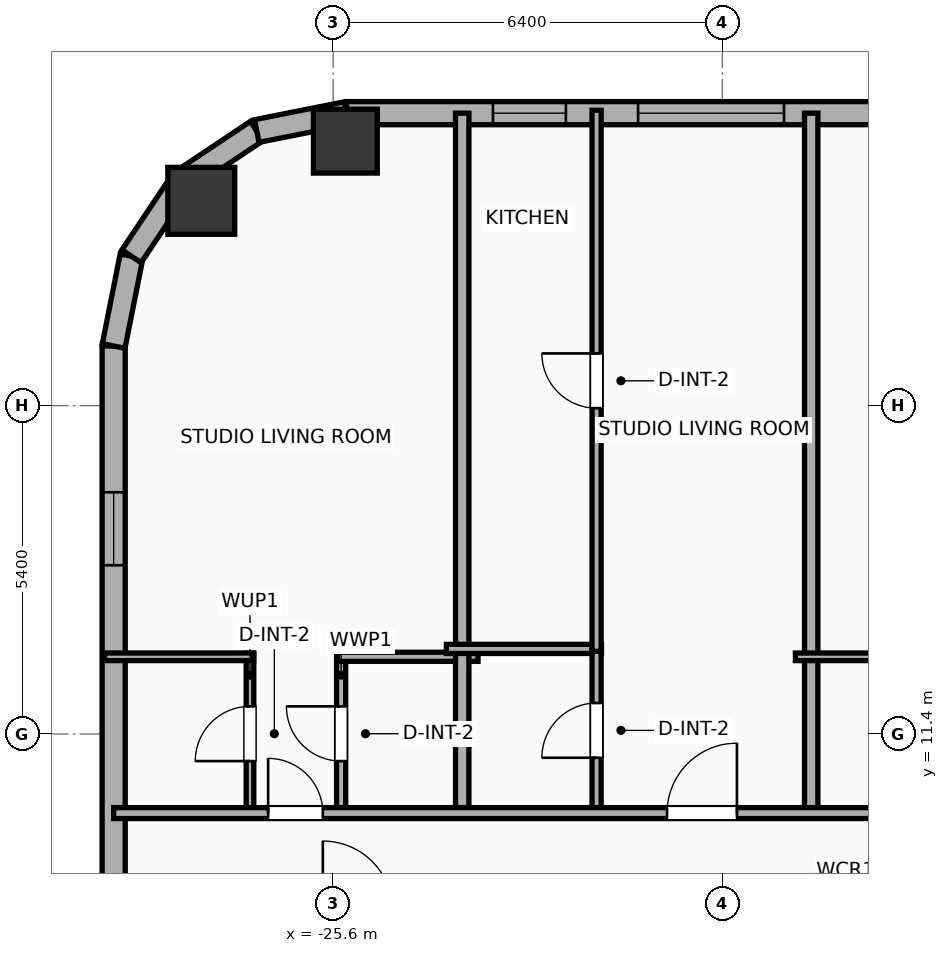
"""IFC4 building model, lengths in metres.
Left out: names, types, materials, properties, quantities, classifications, styles, units other than length and angle.
Written with IfcOpenShell. Run it as: python <this file> out.ifc"""

import sys

from ifc_helpers import new_model, si_unit, direction, frame, frame_2d, origin, origin_2d, place, context, subcontext, project, spatial, rectangle, hollow_rectangle, hollow_circle, extrude, element, fill, save


model = new_model("IFC4")
c1 = context("Model", 3, precision=1e-05, world=origin(), true_north=direction((0.0, 1.0)))
c2 = subcontext(c1, "Body", "Model", "MODEL_VIEW")
j1 = project(units=[si_unit("LENGTHUNIT", "METRE"), si_unit("PLANEANGLEUNIT", "RADIAN")], contexts=[c1])
p1 = place(None, origin())
s1 = spatial("IfcSite", under=j1, at=p1, CompositionType="ELEMENT")
p2 = place(p1, origin())
s2 = spatial("IfcBuilding", under=s1, at=p2, CompositionType="ELEMENT")
p3 = place(p2, frame((0.0, 0.0, 124.8)))
s3 = spatial("IfcBuildingStorey", under=s2, at=p3, CompositionType="ELEMENT", Elevation=124.8)
p4 = place(p3, frame((-25.4, 21.15, 0.0), z_axis=(0.0, 0.0, 1.0), x_axis=(1.0, 0.0, 0.0)))
e1 = element("IfcColumn", 1, at=p4, inside=s3, PredefinedType="COLUMN", context=c2, shape_type="SweptSolid", body=[
    extrude(hollow_rectangle(XDim=1.05, YDim=1.05, WallThickness=0.036, at=origin_2d()), origin(), (0.0, 0.0, 1.0), 3.9),
])
p5 = place(p3, frame((-27.769, 20.169, 0.0), z_axis=(0.0, 0.0, 1.0), x_axis=(1.0, 0.0, 0.0)))
e2 = element("IfcColumn", 2, at=p5, inside=s3, PredefinedType="COLUMN", context=c2, shape_type="SweptSolid", body=[
    extrude(hollow_circle(Radius=0.55, WallThickness=0.036, at=origin_2d()), origin(), (0.0, 0.0, 1.0), 3.9),
])
p6 = place(p3, frame((-29.21, -16.581, 0.0), z_axis=(0.0, 0.0, 1.0), x_axis=(0.0, 1.0, 0.0)))
e3 = element("IfcWall", 3, at=p6, inside=s3, PredefinedType="ELEMENTEDWALL", context=c2, shape_type="SweptSolid", body=[
    extrude(rectangle(XDim=34.363, YDim=0.38, at=frame_2d((17.181, 0.0))), origin(), (0.0, 0.0, 1.0), 3.65),
])
p7 = place(p6, frame((30.757, 0.0, 0.75)))
e4 = element("IfcOpeningElement", 4, at=p7, cuts=e3, PredefinedType="OPENING", context=c2, shape_type="SweptSolid", body=[
    extrude(rectangle(XDim=1.2, YDim=2.05, at=frame_2d((0.6, 1.025))), frame((0.0, 0.2, 0.0), z_axis=(0.0, -1.0, 0.0), x_axis=(1.0, 0.0, 0.0)), (0.0, 0.0, 1.0), 0.4),
])
p8 = place(p6, frame((20.326, 0.0, 0.75)))
e5 = element("IfcOpeningElement", 5, at=p8, cuts=e3, PredefinedType="OPENING", context=c2, shape_type="SweptSolid", body=[
    extrude(rectangle(XDim=1.2, YDim=2.05, at=frame_2d((0.6, 1.025))), frame((0.0, 0.2, 0.0), z_axis=(0.0, -1.0, 0.0), x_axis=(1.0, 0.0, 0.0)), (0.0, 0.0, 1.0), 0.4),
])
p9 = place(p6, frame((11.776, 0.0, 0.75)))
e6 = element("IfcOpeningElement", 6, at=p9, cuts=e3, PredefinedType="OPENING", context=c2, shape_type="SweptSolid", body=[
    extrude(rectangle(XDim=1.2, YDim=2.05, at=frame_2d((0.6, 1.025))), frame((0.0, 0.2, 0.0), z_axis=(0.0, -1.0, 0.0), x_axis=(1.0, 0.0, 0.0)), (0.0, 0.0, 1.0), 0.4),
])
p10 = place(p3, frame((-29.21, 17.781, 0.0), z_axis=(0.0, 0.0, 1.0), x_axis=(0.195086038585, 0.980786132421, 0.0)))
e7 = element("IfcWall", 7, at=p10, inside=s3, PredefinedType="ELEMENTEDWALL", context=c2, shape_type="SweptSolid", body=[
    extrude(rectangle(XDim=1.504, YDim=0.38, at=frame_2d((0.752, 0.0))), origin(), (0.0, 0.0, 1.0), 3.65),
])
p11 = place(p3, frame((-28.917, 19.257, 0.0), z_axis=(0.0, 0.0, 1.0), x_axis=(0.555610286119, 0.831442848281, 0.0)))
e8 = element("IfcWall", 8, at=p11, inside=s3, PredefinedType="ELEMENTEDWALL", context=c2, shape_type="SweptSolid", body=[
    extrude(rectangle(XDim=1.485, YDim=0.38, at=frame_2d((0.743, 0.0))), origin(), (0.0, 0.0, 1.0), 3.65),
])
p12 = place(p3, frame((-28.091, 20.491, 0.0), z_axis=(0.0, 0.0, 1.0), x_axis=(0.831468045563, 0.555572577804, 0.0)))
e9 = element("IfcWall", 9, at=p12, inside=s3, PredefinedType="ELEMENTEDWALL", context=c2, shape_type="SweptSolid", body=[
    extrude(rectangle(XDim=1.485, YDim=0.38, at=frame_2d((0.742, 0.0))), origin(), (0.0, 0.0, 1.0), 3.65),
])
p13 = place(p3, frame((-26.857, 21.316, 0.0), z_axis=(0.0, 0.0, 1.0), x_axis=(0.980755066645, 0.195242155415, 0.0)))
e10 = element("IfcWall", 10, at=p13, inside=s3, PredefinedType="ELEMENTEDWALL", context=c2, shape_type="SweptSolid", body=[
    extrude(rectangle(XDim=1.504, YDim=0.38, at=frame_2d((0.752, 0.0))), origin(), (0.0, 0.0, 1.0), 3.65),
])
p14 = place(p3, frame((-25.381, 21.61, 0.0), z_axis=(0.0, 0.0, 1.0), x_axis=(1.0, 0.0, 0.0)))
e11 = element("IfcWall", 11, at=p14, inside=s3, PredefinedType="ELEMENTEDWALL", context=c2, shape_type="SweptSolid", body=[
    extrude(rectangle(XDim=54.763, YDim=0.38, at=frame_2d((27.381, 0.0))), origin(), (0.0, 0.0, 1.0), 3.65),
])
p15 = place(p14, frame((4.795, 0.0, 0.75)))
e12 = element("IfcOpeningElement", 12, at=p15, cuts=e11, PredefinedType="OPENING", context=c2, shape_type="SweptSolid", body=[
    extrude(rectangle(XDim=2.4, YDim=2.1, at=frame_2d((1.2, 1.05))), frame((0.0, 0.2, 0.0), z_axis=(0.0, -1.0, 0.0), x_axis=(1.0, 0.0, 0.0)), (0.0, 0.0, 1.0), 0.4),
])
p16 = place(p14, frame((45.867, 0.0, 0.75)))
e13 = element("IfcOpeningElement", 13, at=p16, cuts=e11, PredefinedType="OPENING", context=c2, shape_type="SweptSolid", body=[
    extrude(rectangle(XDim=2.4, YDim=2.1, at=frame_2d((1.2, 1.05))), frame((0.0, 0.2, 0.0), z_axis=(0.0, -1.0, 0.0), x_axis=(1.0, 0.0, 0.0)), (0.0, 0.0, 1.0), 0.4),
])
p17 = place(p14, frame((2.408, 0.0, 0.75)))
e14 = element("IfcOpeningElement", 14, at=p17, cuts=e11, PredefinedType="OPENING", context=c2, shape_type="SweptSolid", body=[
    extrude(rectangle(XDim=1.2, YDim=2.05, at=frame_2d((0.6, 1.025))), frame((0.0, 0.2, 0.0), z_axis=(0.0, -1.0, 0.0), x_axis=(1.0, 0.0, 0.0)), (0.0, 0.0, 1.0), 0.4),
])
p18 = place(p14, frame((8.952, 0.0, 0.75)))
e15 = element("IfcOpeningElement", 15, at=p18, cuts=e11, PredefinedType="OPENING", context=c2, shape_type="SweptSolid", body=[
    extrude(rectangle(XDim=1.2, YDim=2.05, at=frame_2d((0.6, 1.025))), frame((0.0, 0.2, 0.0), z_axis=(0.0, -1.0, 0.0), x_axis=(1.0, 0.0, 0.0)), (0.0, 0.0, 1.0), 0.4),
])
p19 = place(p14, frame((17.132, 0.0, 0.75)))
e16 = element("IfcOpeningElement", 16, at=p19, cuts=e11, PredefinedType="OPENING", context=c2, shape_type="SweptSolid", body=[
    extrude(rectangle(XDim=1.2, YDim=2.05, at=frame_2d((0.6, 1.025))), frame((0.0, 0.2, 0.0), z_axis=(0.0, -1.0, 0.0), x_axis=(1.0, 0.0, 0.0)), (0.0, 0.0, 1.0), 0.4),
])
p20 = place(p14, frame((14.007, 0.0, 0.75)))
e17 = element("IfcOpeningElement", 17, at=p20, cuts=e11, PredefinedType="OPENING", context=c2, shape_type="SweptSolid", body=[
    extrude(rectangle(XDim=1.2, YDim=2.05, at=frame_2d((0.6, 1.025))), frame((0.0, 0.2, 0.0), z_axis=(0.0, -1.0, 0.0), x_axis=(1.0, 0.0, 0.0)), (0.0, 0.0, 1.0), 0.4),
])
p21 = place(p14, frame((22.636, 0.0, 0.75)))
e18 = element("IfcOpeningElement", 18, at=p21, cuts=e11, PredefinedType="OPENING", context=c2, shape_type="SweptSolid", body=[
    extrude(rectangle(XDim=1.2, YDim=2.05, at=frame_2d((0.6, 1.025))), frame((0.0, 0.2, 0.0), z_axis=(0.0, -1.0, 0.0), x_axis=(1.0, 0.0, 0.0)), (0.0, 0.0, 1.0), 0.4),
])
p22 = place(p14, frame((27.129, 0.0, 0.75)))
e19 = element("IfcOpeningElement", 19, at=p22, cuts=e11, PredefinedType="OPENING", context=c2, shape_type="SweptSolid", body=[
    extrude(rectangle(XDim=1.2, YDim=2.05, at=frame_2d((0.6, 1.025))), frame((0.0, 0.2, 0.0), z_axis=(0.0, -1.0, 0.0), x_axis=(1.0, 0.0, 0.0)), (0.0, 0.0, 1.0), 0.4),
])
p23 = place(p14, frame((30.254, 0.0, 0.75)))
e20 = element("IfcOpeningElement", 20, at=p23, cuts=e11, PredefinedType="OPENING", context=c2, shape_type="SweptSolid", body=[
    extrude(rectangle(XDim=1.2, YDim=2.05, at=frame_2d((0.6, 1.025))), frame((0.0, 0.2, 0.0), z_axis=(0.0, -1.0, 0.0), x_axis=(1.0, 0.0, 0.0)), (0.0, 0.0, 1.0), 0.4),
])
p24 = place(p14, frame((33.603, 0.0, 0.75)))
e21 = element("IfcOpeningElement", 21, at=p24, cuts=e11, PredefinedType="OPENING", context=c2, shape_type="SweptSolid", body=[
    extrude(rectangle(XDim=1.2, YDim=2.05, at=frame_2d((0.6, 1.025))), frame((0.0, 0.2, 0.0), z_axis=(0.0, -1.0, 0.0), x_axis=(1.0, 0.0, 0.0)), (0.0, 0.0, 1.0), 0.4),
])
p25 = place(p14, frame((36.608, 0.0, 0.75)))
e22 = element("IfcOpeningElement", 22, at=p25, cuts=e11, PredefinedType="OPENING", context=c2, shape_type="SweptSolid", body=[
    extrude(rectangle(XDim=1.2, YDim=2.05, at=frame_2d((0.6, 1.025))), frame((0.0, 0.2, 0.0), z_axis=(0.0, -1.0, 0.0), x_axis=(1.0, 0.0, 0.0)), (0.0, 0.0, 1.0), 0.4),
])
p26 = place(p14, frame((39.446, 0.0, 0.75)))
e23 = element("IfcOpeningElement", 23, at=p26, cuts=e11, PredefinedType="OPENING", context=c2, shape_type="SweptSolid", body=[
    extrude(rectangle(XDim=1.2, YDim=2.05, at=frame_2d((0.6, 1.025))), frame((0.0, 0.2, 0.0), z_axis=(0.0, -1.0, 0.0), x_axis=(1.0, 0.0, 0.0)), (0.0, 0.0, 1.0), 0.4),
])
p27 = place(p14, frame((42.27, 0.0, 0.75)))
e24 = element("IfcOpeningElement", 24, at=p27, cuts=e11, PredefinedType="OPENING", context=c2, shape_type="SweptSolid", body=[
    extrude(rectangle(XDim=0.85, YDim=2.05, at=frame_2d((0.425, 1.025))), frame((0.0, 0.2, 0.0), z_axis=(0.0, -1.0, 0.0), x_axis=(1.0, 0.0, 0.0)), (0.0, 0.0, 1.0), 0.4),
])
p28 = place(p14, frame((49.554, 0.0, 0.75)))
e25 = element("IfcOpeningElement", 25, at=p28, cuts=e11, PredefinedType="OPENING", context=c2, shape_type="SweptSolid", body=[
    extrude(rectangle(XDim=1.2, YDim=2.05, at=frame_2d((0.6, 1.025))), frame((0.0, 0.2, 0.0), z_axis=(0.0, -1.0, 0.0), x_axis=(1.0, 0.0, 0.0)), (0.0, 0.0, 1.0), 0.4),
])
p29 = place(p14, frame((52.266, 0.0, 0.75)))
e26 = element("IfcOpeningElement", 26, at=p29, cuts=e11, PredefinedType="OPENING", context=c2, shape_type="SweptSolid", body=[
    extrude(rectangle(XDim=1.2, YDim=2.05, at=frame_2d((0.6, 1.025))), frame((0.0, 0.2, 0.0), z_axis=(0.0, -1.0, 0.0), x_axis=(1.0, 0.0, 0.0)), (0.0, 0.0, 1.0), 0.4),
])
p30 = place(p3, frame((-26.968, 10.08, 0.0), z_axis=(0.0, 0.0, 1.0), x_axis=(0.0, 1.0, 0.0)))
e27 = element("IfcWall", 27, at=p30, inside=s3, PredefinedType="PARTITIONING", context=c2, shape_type="SweptSolid", body=[
    extrude(rectangle(XDim=2.65, YDim=0.125, at=frame_2d((1.325, 0.0))), origin(), (0.0, 0.0, 1.0), 3.65),
])
p31 = place(p30, frame((0.875, 0.0, 0.0)))
e28 = element("IfcOpeningElement", 28, at=p31, cuts=e27, PredefinedType="OPENING", context=c2, shape_type="SweptSolid", body=[
    extrude(rectangle(XDim=0.9, YDim=2.05, at=frame_2d((0.45, 1.025))), frame((0.0, 0.073, 0.0), z_axis=(0.0, -1.0, 0.0), x_axis=(1.0, 0.0, 0.0)), (0.0, 0.0, 1.0), 0.145),
])
p32 = place(p3, frame((-25.469, 10.08, 0.0), z_axis=(0.0, 0.0, 1.0), x_axis=(0.0, 1.0, 0.0)))
e29 = element("IfcWall", 29, at=p32, inside=s3, PredefinedType="PLUMBINGWALL", context=c2, shape_type="SweptSolid", body=[
    extrude(rectangle(XDim=2.65, YDim=0.15, at=frame_2d((1.325, 0.0))), origin(), (0.0, 0.0, 1.0), 3.65),
])
p33 = place(p32, frame((0.875, 0.0, 0.0)))
e30 = element("IfcOpeningElement", 30, at=p33, cuts=e29, PredefinedType="OPENING", context=c2, shape_type="SweptSolid", body=[
    extrude(rectangle(XDim=0.9, YDim=2.05, at=frame_2d((0.45, 1.025))), frame((0.0, 0.085, 0.0), z_axis=(0.0, -1.0, 0.0), x_axis=(1.0, 0.0, 0.0)), (0.0, 0.0, 1.0), 0.17),
])
p34 = place(p3, frame((-29.36, 12.67, 0.0), z_axis=(0.0, 0.0, 1.0), x_axis=(1.0, 0.0, 0.0)))
e31 = element("IfcWall", 31, at=p34, inside=s3, PredefinedType="PARTITIONING", context=c2, shape_type="SweptSolid", body=[
    extrude(rectangle(XDim=2.452, YDim=0.125, at=frame_2d((1.226, 0.0))), origin(), (0.0, 0.0, 1.0), 3.65),
])
p35 = place(p3, frame((-25.529, 12.67, 0.0), z_axis=(0.0, 0.0, 1.0), x_axis=(1.0, 0.0, 0.0)))
e32 = element("IfcWall", 32, at=p35, inside=s3, PredefinedType="PLUMBINGWALL", context=c2, shape_type="SweptSolid", body=[
    extrude(rectangle(XDim=2.311, YDim=0.15, at=frame_2d((1.156, 0.0))), origin(), (0.0, 0.0, 1.0), 3.65),
])
p36 = place(p3, frame((-23.478, 10.02, 0.0), z_axis=(0.0, 0.0, 1.0), x_axis=(0.0, 1.0, 0.0)))
e33 = element("IfcWall", 33, at=p36, inside=s3, PredefinedType="PARTITIONING", context=c2, shape_type="SweptSolid", body=[
    extrude(rectangle(XDim=11.59, YDim=0.22, at=frame_2d((5.795, 0.0))), origin(), (0.0, 0.0, 1.0), 3.65),
])
p37 = place(p3, frame((-23.738, 12.8, 0.0), z_axis=(0.0, 0.0, 1.0), x_axis=(1.0, 0.0, 0.0)))
e34 = element("IfcWall", 34, at=p37, inside=s3, PredefinedType="PLUMBINGWALL", context=c2, shape_type="SweptSolid", body=[
    extrude(rectangle(XDim=2.55, YDim=0.15, at=frame_2d((1.275, 0.0))), origin(), (0.0, 0.0, 1.0), 3.65),
])
p38 = place(p3, frame((-21.268, 10.08, 0.0), z_axis=(0.0, 0.0, 1.0), x_axis=(0.0, 1.0, 0.0)))
e35 = element("IfcWall", 35, at=p38, inside=s3, PredefinedType="PLUMBINGWALL", context=c2, shape_type="SweptSolid", body=[
    extrude(rectangle(XDim=2.76, YDim=0.15, at=frame_2d((1.38, 0.0))), origin(), (0.0, 0.0, 1.0), 3.65),
])
p39 = place(p38, frame((0.93, 0.0, 0.0)))
e36 = element("IfcOpeningElement", 36, at=p39, cuts=e35, PredefinedType="OPENING", context=c2, shape_type="SweptSolid", body=[
    extrude(rectangle(XDim=0.9, YDim=2.05, at=frame_2d((0.45, 1.025))), frame((0.0, 0.085, 0.0), z_axis=(0.0, -1.0, 0.0), x_axis=(1.0, 0.0, 0.0)), (0.0, 0.0, 1.0), 0.17),
])
p40 = place(p3, frame((-21.268, 12.76, 0.0), z_axis=(0.0, 0.0, 1.0), x_axis=(0.0, 1.0, 0.0)))
e37 = element("IfcWall", 37, at=p40, inside=s3, PredefinedType="PLUMBINGWALL", context=c2, shape_type="SweptSolid", body=[
    extrude(rectangle(XDim=8.898, YDim=0.15, at=frame_2d((4.449, 0.0))), origin(), (0.0, 0.0, 1.0), 3.65),
])
p41 = place(p40, frame((3.999, 0.0, 0.0)))
e38 = element("IfcOpeningElement", 38, at=p41, cuts=e37, PredefinedType="OPENING", context=c2, shape_type="SweptSolid", body=[
    extrude(rectangle(XDim=0.9, YDim=2.05, at=frame_2d((0.45, 1.025))), frame((0.0, 0.085, 0.0), z_axis=(0.0, -1.0, 0.0), x_axis=(1.0, 0.0, 0.0)), (0.0, 0.0, 1.0), 0.17),
])
p42 = place(p3, frame((-17.739, 10.02, 0.0), z_axis=(0.0, 0.0, 1.0), x_axis=(0.0, 1.0, 0.0)))
e39 = element("IfcWall", 39, at=p42, inside=s3, PredefinedType="PARTITIONING", context=c2, shape_type="SweptSolid", body=[
    extrude(rectangle(XDim=11.59, YDim=0.22, at=frame_2d((5.795, 0.0))), origin(), (0.0, 0.0, 1.0), 3.65),
])
p43 = place(p3, frame((-17.999, 12.67, 0.0), z_axis=(0.0, 0.0, 1.0), x_axis=(1.0, 0.0, 0.0)))
e40 = element("IfcWall", 40, at=p43, inside=s3, PredefinedType="PARTITIONING", context=c2, shape_type="SweptSolid", body=[
    extrude(rectangle(XDim=2.63, YDim=0.125, at=frame_2d((1.315, 0.0))), origin(), (0.0, 0.0, 1.0), 3.65),
])
p44 = place(p3, frame((-29.21, 10.1, 0.0), z_axis=(0.0, 0.0, 1.0), x_axis=(1.0, 0.0, 0.0)))
e41 = element("IfcWall", 41, at=p44, inside=s3, PredefinedType="PARTITIONING", context=c2, shape_type="SweptSolid", body=[
    extrude(rectangle(XDim=62.42, YDim=0.18, at=frame_2d((31.21, 0.0))), origin(), (0.0, 0.0, 1.0), 3.65),
])
p45 = place(p44, frame((2.54, 0.0, 0.0)))
e42 = element("IfcOpeningElement", 42, at=p45, cuts=e41, PredefinedType="OPENING", context=c2, shape_type="SweptSolid", body=[
    extrude(rectangle(XDim=0.9, YDim=2.05, at=frame_2d((0.45, 1.025))), frame((0.0, 0.1, 0.0), z_axis=(0.0, -1.0, 0.0), x_axis=(1.0, 0.0, 0.0)), (0.0, 0.0, 1.0), 0.2),
])
p46 = place(p44, frame((9.1, 0.0, 0.0)))
e43 = element("IfcOpeningElement", 43, at=p46, cuts=e41, PredefinedType="OPENING", context=c2, shape_type="SweptSolid", body=[
    extrude(rectangle(XDim=1.15, YDim=2.05, at=frame_2d((0.575, 1.025))), frame((0.0, 0.1, 0.0), z_axis=(0.0, -1.0, 0.0), x_axis=(1.0, 0.0, 0.0)), (0.0, 0.0, 1.0), 0.2),
])
p47 = place(p44, frame((14.063, 0.0, 0.0)))
e44 = element("IfcOpeningElement", 44, at=p47, cuts=e41, PredefinedType="OPENING", context=c2, shape_type="SweptSolid", body=[
    extrude(rectangle(XDim=0.9, YDim=2.05, at=frame_2d((0.45, 1.025))), frame((0.0, 0.1, 0.0), z_axis=(0.0, -1.0, 0.0), x_axis=(1.0, 0.0, 0.0)), (0.0, 0.0, 1.0), 0.2),
])
p48 = place(p44, frame((20.954, 0.0, 0.0)))
e45 = element("IfcOpeningElement", 45, at=p48, cuts=e41, PredefinedType="OPENING", context=c2, shape_type="SweptSolid", body=[
    extrude(rectangle(XDim=1.15, YDim=2.05, at=frame_2d((0.575, 1.025))), frame((0.0, 0.1, 0.0), z_axis=(0.0, -1.0, 0.0), x_axis=(1.0, 0.0, 0.0)), (0.0, 0.0, 1.0), 0.2),
])
p49 = place(p44, frame((26.26, 0.0, 0.0)))
e46 = element("IfcOpeningElement", 46, at=p49, cuts=e41, PredefinedType="OPENING", context=c2, shape_type="SweptSolid", body=[
    extrude(rectangle(XDim=0.9, YDim=2.05, at=frame_2d((0.45, 1.025))), frame((0.0, 0.1, 0.0), z_axis=(0.0, -1.0, 0.0), x_axis=(1.0, 0.0, 0.0)), (0.0, 0.0, 1.0), 0.2),
])
p50 = place(p44, frame((31.01, 0.0, 0.0)))
e47 = element("IfcOpeningElement", 47, at=p50, cuts=e41, PredefinedType="OPENING", context=c2, shape_type="SweptSolid", body=[
    extrude(rectangle(XDim=1.15, YDim=2.05, at=frame_2d((0.575, 1.025))), frame((0.0, 0.1, 0.0), z_axis=(0.0, -1.0, 0.0), x_axis=(1.0, 0.0, 0.0)), (0.0, 0.0, 1.0), 0.2),
])
p51 = place(p44, frame((37.37, 0.0, 0.0)))
e48 = element("IfcOpeningElement", 48, at=p51, cuts=e41, PredefinedType="OPENING", context=c2, shape_type="SweptSolid", body=[
    extrude(rectangle(XDim=1.15, YDim=2.05, at=frame_2d((0.575, 1.025))), frame((0.0, 0.1, 0.0), z_axis=(0.0, -1.0, 0.0), x_axis=(1.0, 0.0, 0.0)), (0.0, 0.0, 1.0), 0.2),
])
p52 = place(p44, frame((45.298, 0.0, 0.0)))
e49 = element("IfcOpeningElement", 49, at=p52, cuts=e41, PredefinedType="OPENING", context=c2, shape_type="SweptSolid", body=[
    extrude(rectangle(XDim=0.9, YDim=2.05, at=frame_2d((0.45, 1.025))), frame((0.0, 0.1, 0.0), z_axis=(0.0, -1.0, 0.0), x_axis=(1.0, 0.0, 0.0)), (0.0, 0.0, 1.0), 0.2),
])
p53 = place(p44, frame((52.033, 0.0, 0.0)))
e50 = element("IfcOpeningElement", 50, at=p53, cuts=e41, PredefinedType="OPENING", context=c2, shape_type="SweptSolid", body=[
    extrude(rectangle(XDim=0.9, YDim=2.05, at=frame_2d((0.45, 1.025))), frame((0.0, 0.1, 0.0), z_axis=(0.0, -1.0, 0.0), x_axis=(1.0, 0.0, 0.0)), (0.0, 0.0, 1.0), 0.2),
])
p54 = place(p44, frame((58.805, 0.0, 0.0)))
e51 = element("IfcOpeningElement", 51, at=p54, cuts=e41, PredefinedType="OPENING", context=c2, shape_type="SweptSolid", body=[
    extrude(rectangle(XDim=0.9, YDim=2.05, at=frame_2d((0.45, 1.025))), frame((0.0, 0.1, 0.0), z_axis=(0.0, -1.0, 0.0), x_axis=(1.0, 0.0, 0.0)), (0.0, 0.0, 1.0), 0.2),
])
p55 = place(p15, origin())
e52 = element("IfcWindow", 52, at=p55, inside=s3, PartitioningType="SINGLE_PANEL", PredefinedType="WINDOW", context=c2, shape_type="SweptSolid", body=[
    extrude(rectangle(XDim=2.4, YDim=2.1, at=frame_2d((1.2, 1.05))), frame((0.0, 0.03, 0.0), z_axis=(0.0, -1.0, 0.0), x_axis=(1.0, 0.0, 0.0)), (0.0, 0.0, 1.0), 0.06),
])
fill(e12, e52)
p56 = place(p7, origin())
e53 = element("IfcWindow", 53, at=p56, inside=s3, PartitioningType="SINGLE_PANEL", PredefinedType="WINDOW", context=c2, shape_type="SweptSolid", body=[
    extrude(rectangle(XDim=1.2, YDim=2.05, at=frame_2d((0.6, 1.025))), frame((0.0, 0.03, 0.0), z_axis=(0.0, -1.0, 0.0), x_axis=(1.0, 0.0, 0.0)), (0.0, 0.0, 1.0), 0.06),
])
fill(e4, e53)
p57 = place(p17, origin())
e54 = element("IfcWindow", 54, at=p57, inside=s3, PartitioningType="SINGLE_PANEL", PredefinedType="WINDOW", context=c2, shape_type="SweptSolid", body=[
    extrude(rectangle(XDim=1.2, YDim=2.05, at=frame_2d((0.6, 1.025))), frame((0.0, 0.03, 0.0), z_axis=(0.0, -1.0, 0.0), x_axis=(1.0, 0.0, 0.0)), (0.0, 0.0, 1.0), 0.06),
])
fill(e14, e54)
p58 = place(p31, origin())
e55 = element("IfcDoor", 55, at=p58, inside=s3, OperationType="SINGLE_SWING_LEFT", PredefinedType="DOOR", context=c2, shape_type="SweptSolid", body=[
    extrude(rectangle(XDim=0.9, YDim=2.05, at=frame_2d((0.45, 1.025))), frame((0.0, 0.025, 0.0), z_axis=(0.0, -1.0, 0.0), x_axis=(1.0, 0.0, 0.0)), (0.0, 0.0, 1.0), 0.05),
])
fill(e28, e55)
p59 = place(p33, origin())
e56 = element("IfcDoor", 56, at=p59, inside=s3, OperationType="SINGLE_SWING_RIGHT", PredefinedType="DOOR", context=c2, shape_type="SweptSolid", body=[
    extrude(rectangle(XDim=0.9, YDim=2.05, at=frame_2d((0.45, 1.025))), frame((0.0, 0.025, 0.0), z_axis=(0.0, -1.0, 0.0), x_axis=(1.0, 0.0, 0.0)), (0.0, 0.0, 1.0), 0.05),
])
fill(e30, e56)
p60 = place(p39, origin())
e57 = element("IfcDoor", 57, at=p60, inside=s3, OperationType="SINGLE_SWING_LEFT", PredefinedType="DOOR", context=c2, shape_type="SweptSolid", body=[
    extrude(rectangle(XDim=0.9, YDim=2.05, at=frame_2d((0.45, 1.025))), frame((0.0, 0.025, 0.0), z_axis=(0.0, -1.0, 0.0), x_axis=(1.0, 0.0, 0.0)), (0.0, 0.0, 1.0), 0.05),
])
fill(e36, e57)
p61 = place(p41, origin())
e58 = element("IfcDoor", 58, at=p61, inside=s3, OperationType="SINGLE_SWING_RIGHT", PredefinedType="DOOR", context=c2, shape_type="SweptSolid", body=[
    extrude(rectangle(XDim=0.9, YDim=2.05, at=frame_2d((0.45, 1.025))), frame((0.0, 0.025, 0.0), z_axis=(0.0, -1.0, 0.0), x_axis=(1.0, 0.0, 0.0)), (0.0, 0.0, 1.0), 0.05),
])
fill(e38, e58)
p62 = place(p45, origin())
e59 = element("IfcDoor", 59, at=p62, inside=s3, OperationType="SINGLE_SWING_LEFT", PredefinedType="DOOR", context=c2, shape_type="SweptSolid", body=[
    extrude(rectangle(XDim=0.9, YDim=2.05, at=frame_2d((0.45, 1.025))), frame((0.0, 0.025, 0.0), z_axis=(0.0, -1.0, 0.0), x_axis=(1.0, 0.0, 0.0)), (0.0, 0.0, 1.0), 0.05),
])
fill(e42, e59)
p63 = place(p46, origin())
e60 = element("IfcDoor", 60, at=p63, inside=s3, OperationType="SINGLE_SWING_RIGHT", PredefinedType="DOOR", context=c2, shape_type="SweptSolid", body=[
    extrude(rectangle(XDim=1.15, YDim=2.05, at=frame_2d((0.575, 1.025))), frame((0.0, 0.025, 0.0), z_axis=(0.0, -1.0, 0.0), x_axis=(1.0, 0.0, 0.0)), (0.0, 0.0, 1.0), 0.05),
])
fill(e43, e60)
save(model, sys.argv[1])
